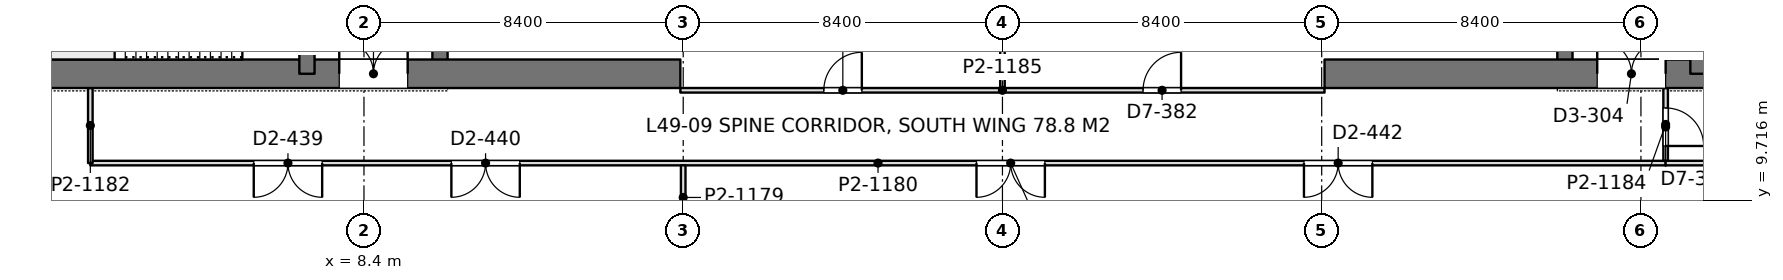
"""IFC4 building model, lengths in metres.
Left out: names, types, materials, properties, quantities, classifications, styles, units other than length and angle.
Written with IfcOpenShell. Run it as: python <this file> out.ifc"""

import sys

from ifc_helpers import new_model, si_unit, direction, frame, frame_2d, origin, place, context, subcontext, project, spatial, rectangle, extrude, element, fill, save


model = new_model("IFC4")
c1 = context("Model", 3, precision=1e-05, world=origin(), true_north=direction((0.0, 1.0)))
c2 = subcontext(c1, "Body", "Model", "MODEL_VIEW")
j1 = project(units=[si_unit("LENGTHUNIT", "METRE"), si_unit("PLANEANGLEUNIT", "RADIAN")], contexts=[c1])
p1 = place(None, origin())
s1 = spatial("IfcSite", under=j1, at=p1, CompositionType="ELEMENT")
p2 = place(p1, origin())
s2 = spatial("IfcBuilding", under=s1, at=p2, CompositionType="ELEMENT")
p3 = place(p2, frame((0.0, 0.0, 215.4)))
s3 = spatial("IfcBuildingStorey", under=s2, at=p3, CompositionType="ELEMENT", Elevation=215.4)
p4 = place(p3, frame((-1.125, 13.05, 0.0), z_axis=(0.0, 0.0, 1.0), x_axis=(1.0, 0.0, 0.0)))
e1 = element("IfcWall", 1, at=p4, inside=s3, PredefinedType="SHEAR", context=c2, shape_type="SweptSolid", body=[
    extrude(rectangle(XDim=17.85, YDim=0.75, at=frame_2d((8.925, 0.0))), origin(), (0.0, 0.0, 1.0), 4.2),
])
p5 = place(p4, frame((8.875, 0.0, 0.0)))
e2 = element("IfcOpeningElement", 2, at=p5, cuts=e1, PredefinedType="OPENING", context=c2, shape_type="SweptSolid", body=[
    extrude(rectangle(XDim=1.8, YDim=2.4, at=frame_2d((0.9, 1.2))), frame((0.0, 0.385, 0.0), z_axis=(0.0, -1.0, 0.0), x_axis=(1.0, 0.0, 0.0)), (0.0, 0.0, 1.0), 0.77),
])
p6 = place(p3, frame((6.9, 13.05, 0.0), z_axis=(0.0, 0.0, 1.0), x_axis=(0.0, 1.0, 0.0)))
e3 = element("IfcWall", 3, at=p6, inside=s3, PredefinedType="SHEAR", context=c2, shape_type="SweptSolid", body=[
    extrude(rectangle(XDim=24.3, YDim=0.4, at=frame_2d((12.15, 0.0))), origin(), (0.0, 0.0, 1.0), 4.2),
])
p7 = place(p6, frame((1.3, 0.0, 0.0)))
e4 = element("IfcOpeningElement", 4, at=p7, cuts=e3, PredefinedType="OPENING", context=c2, shape_type="SweptSolid", body=[
    extrude(rectangle(XDim=1.0, YDim=2.2, at=frame_2d((0.5, 1.1))), frame((0.0, 0.21, 0.0), z_axis=(0.0, -1.0, 0.0), x_axis=(1.0, 0.0, 0.0)), (0.0, 0.0, 1.0), 0.42),
])
p8 = place(p6, frame((22.0, 0.0, 0.0)))
e5 = element("IfcOpeningElement", 5, at=p8, cuts=e3, PredefinedType="OPENING", context=c2, shape_type="SweptSolid", body=[
    extrude(rectangle(XDim=1.0, YDim=2.2, at=frame_2d((0.5, 1.1))), frame((0.0, 0.21, 0.0), z_axis=(0.0, -1.0, 0.0), x_axis=(1.0, 0.0, 0.0)), (0.0, 0.0, 1.0), 0.42),
])
p9 = place(p6, frame((5.55, 0.0, 0.0)))
e6 = element("IfcOpeningElement", 6, at=p9, cuts=e3, PredefinedType="OPENING", context=c2, shape_type="SweptSolid", body=[
    extrude(rectangle(XDim=1.0, YDim=2.2, at=frame_2d((0.5, 1.1))), frame((0.0, 0.21, 0.0), z_axis=(0.0, -1.0, 0.0), x_axis=(1.0, 0.0, 0.0)), (0.0, 0.0, 1.0), 0.42),
])
p10 = place(p6, frame((9.55, 0.0, 0.0)))
e7 = element("IfcOpeningElement", 7, at=p10, cuts=e3, PredefinedType="OPENING", context=c2, shape_type="SweptSolid", body=[
    extrude(rectangle(XDim=1.0, YDim=2.2, at=frame_2d((0.5, 1.1))), frame((0.0, 0.21, 0.0), z_axis=(0.0, -1.0, 0.0), x_axis=(1.0, 0.0, 0.0)), (0.0, 0.0, 1.0), 0.42),
])
p11 = place(p6, frame((12.8, 0.0, 0.0)))
e8 = element("IfcOpeningElement", 8, at=p11, cuts=e3, PredefinedType="OPENING", context=c2, shape_type="SweptSolid", body=[
    extrude(rectangle(XDim=1.1, YDim=2.2, at=frame_2d((0.55, 1.1))), frame((0.0, 0.21, 0.0), z_axis=(0.0, -1.0, 0.0), x_axis=(1.0, 0.0, 0.0)), (0.0, 0.0, 1.0), 0.42),
])
p12 = place(p6, frame((15.538, 0.0, 0.0)))
e9 = element("IfcOpeningElement", 9, at=p12, cuts=e3, PredefinedType="OPENING", context=c2, shape_type="SweptSolid", body=[
    extrude(rectangle(XDim=1.1, YDim=2.2, at=frame_2d((0.55, 1.1))), frame((0.0, 0.21, 0.0), z_axis=(0.0, -1.0, 0.0), x_axis=(1.0, 0.0, 0.0)), (0.0, 0.0, 1.0), 0.42),
])
p13 = place(p6, frame((18.262, 0.0, 0.0)))
e10 = element("IfcOpeningElement", 10, at=p13, cuts=e3, PredefinedType="OPENING", context=c2, shape_type="SweptSolid", body=[
    extrude(rectangle(XDim=1.1, YDim=2.2, at=frame_2d((0.55, 1.1))), frame((0.0, 0.21, 0.0), z_axis=(0.0, -1.0, 0.0), x_axis=(1.0, 0.0, 0.0)), (0.0, 0.0, 1.0), 0.42),
])
p14 = place(p3, frame((10.4, 13.05, 0.0), z_axis=(0.0, 0.0, 1.0), x_axis=(0.0, 1.0, 0.0)))
e11 = element("IfcWall", 11, at=p14, inside=s3, PredefinedType="SHEAR", context=c2, shape_type="SweptSolid", body=[
    extrude(rectangle(XDim=24.3, YDim=0.4, at=frame_2d((12.15, 0.0))), origin(), (0.0, 0.0, 1.0), 4.2),
])
p15 = place(p14, frame((15.75, 0.0, 0.0)))
e12 = element("IfcOpeningElement", 12, at=p15, cuts=e11, PredefinedType="OPENING", context=c2, shape_type="SweptSolid", body=[
    extrude(rectangle(XDim=1.1, YDim=2.2, at=frame_2d((0.55, 1.1))), frame((0.0, 0.21, 0.0), z_axis=(0.0, -1.0, 0.0), x_axis=(1.0, 0.0, 0.0)), (0.0, 0.0, 1.0), 0.42),
])
p16 = place(p14, frame((18.6, 0.0, 0.0)))
e13 = element("IfcOpeningElement", 13, at=p16, cuts=e11, PredefinedType="OPENING", context=c2, shape_type="SweptSolid", body=[
    extrude(rectangle(XDim=1.1, YDim=2.2, at=frame_2d((0.55, 1.1))), frame((0.0, 0.21, 0.0), z_axis=(0.0, -1.0, 0.0), x_axis=(1.0, 0.0, 0.0)), (0.0, 0.0, 1.0), 0.42),
])
p17 = place(p14, frame((21.45, 0.0, 0.0)))
e14 = element("IfcOpeningElement", 14, at=p17, cuts=e11, PredefinedType="OPENING", context=c2, shape_type="SweptSolid", body=[
    extrude(rectangle(XDim=1.1, YDim=2.2, at=frame_2d((0.55, 1.1))), frame((0.0, 0.21, 0.0), z_axis=(0.0, -1.0, 0.0), x_axis=(1.0, 0.0, 0.0)), (0.0, 0.0, 1.0), 0.42),
])
p18 = place(p14, frame((8.65, 0.0, 0.0)))
e15 = element("IfcOpeningElement", 15, at=p18, cuts=e11, PredefinedType="OPENING", context=c2, shape_type="SweptSolid", body=[
    extrude(rectangle(XDim=1.8, YDim=2.4, at=frame_2d((0.9, 1.2))), frame((0.0, 0.21, 0.0), z_axis=(0.0, -1.0, 0.0), x_axis=(1.0, 0.0, 0.0)), (0.0, 0.0, 1.0), 0.42),
])
p19 = place(p3, frame((33.675, 13.05, 0.0), z_axis=(0.0, 0.0, 1.0), x_axis=(1.0, 0.0, 0.0)))
e16 = element("IfcWall", 16, at=p19, inside=s3, PredefinedType="SHEAR", context=c2, shape_type="SweptSolid", body=[
    extrude(rectangle(XDim=17.85, YDim=0.75, at=frame_2d((8.925, 0.0))), origin(), (0.0, 0.0, 1.0), 4.2),
])
p20 = place(p19, frame((7.175, 0.0, 0.0)))
e17 = element("IfcOpeningElement", 17, at=p20, cuts=e16, PredefinedType="OPENING", context=c2, shape_type="SweptSolid", body=[
    extrude(rectangle(XDim=1.8, YDim=2.4, at=frame_2d((0.9, 1.2))), frame((0.0, 0.385, 0.0), z_axis=(0.0, -1.0, 0.0), x_axis=(1.0, 0.0, 0.0)), (0.0, 0.0, 1.0), 0.77),
])
p21 = place(p3, frame((43.5, 13.05, 0.0), z_axis=(0.0, 0.0, 1.0), x_axis=(0.0, 1.0, 0.0)))
e18 = element("IfcWall", 18, at=p21, inside=s3, PredefinedType="SHEAR", context=c2, shape_type="SweptSolid", body=[
    extrude(rectangle(XDim=24.3, YDim=0.4, at=frame_2d((12.15, 0.0))), origin(), (0.0, 0.0, 1.0), 4.2),
])
p22 = place(p21, frame((1.3, 0.0, 0.0)))
e19 = element("IfcOpeningElement", 19, at=p22, cuts=e18, PredefinedType="OPENING", context=c2, shape_type="SweptSolid", body=[
    extrude(rectangle(XDim=1.0, YDim=2.2, at=frame_2d((0.5, 1.1))), frame((0.0, 0.21, 0.0), z_axis=(0.0, -1.0, 0.0), x_axis=(1.0, 0.0, 0.0)), (0.0, 0.0, 1.0), 0.42),
])
p23 = place(p21, frame((22.0, 0.0, 0.0)))
e20 = element("IfcOpeningElement", 20, at=p23, cuts=e18, PredefinedType="OPENING", context=c2, shape_type="SweptSolid", body=[
    extrude(rectangle(XDim=1.0, YDim=2.2, at=frame_2d((0.5, 1.1))), frame((0.0, 0.21, 0.0), z_axis=(0.0, -1.0, 0.0), x_axis=(1.0, 0.0, 0.0)), (0.0, 0.0, 1.0), 0.42),
])
p24 = place(p21, frame((5.55, 0.0, 0.0)))
e21 = element("IfcOpeningElement", 21, at=p24, cuts=e18, PredefinedType="OPENING", context=c2, shape_type="SweptSolid", body=[
    extrude(rectangle(XDim=1.0, YDim=2.2, at=frame_2d((0.5, 1.1))), frame((0.0, 0.21, 0.0), z_axis=(0.0, -1.0, 0.0), x_axis=(1.0, 0.0, 0.0)), (0.0, 0.0, 1.0), 0.42),
])
p25 = place(p21, frame((9.55, 0.0, 0.0)))
e22 = element("IfcOpeningElement", 22, at=p25, cuts=e18, PredefinedType="OPENING", context=c2, shape_type="SweptSolid", body=[
    extrude(rectangle(XDim=1.0, YDim=2.2, at=frame_2d((0.5, 1.1))), frame((0.0, 0.21, 0.0), z_axis=(0.0, -1.0, 0.0), x_axis=(1.0, 0.0, 0.0)), (0.0, 0.0, 1.0), 0.42),
])
p26 = place(p21, frame((12.8, 0.0, 0.0)))
e23 = element("IfcOpeningElement", 23, at=p26, cuts=e18, PredefinedType="OPENING", context=c2, shape_type="SweptSolid", body=[
    extrude(rectangle(XDim=1.1, YDim=2.2, at=frame_2d((0.55, 1.1))), frame((0.0, 0.21, 0.0), z_axis=(0.0, -1.0, 0.0), x_axis=(1.0, 0.0, 0.0)), (0.0, 0.0, 1.0), 0.42),
])
p27 = place(p21, frame((15.538, 0.0, 0.0)))
e24 = element("IfcOpeningElement", 24, at=p27, cuts=e18, PredefinedType="OPENING", context=c2, shape_type="SweptSolid", body=[
    extrude(rectangle(XDim=1.1, YDim=2.2, at=frame_2d((0.55, 1.1))), frame((0.0, 0.21, 0.0), z_axis=(0.0, -1.0, 0.0), x_axis=(1.0, 0.0, 0.0)), (0.0, 0.0, 1.0), 0.42),
])
p28 = place(p21, frame((18.262, 0.0, 0.0)))
e25 = element("IfcOpeningElement", 25, at=p28, cuts=e18, PredefinedType="OPENING", context=c2, shape_type="SweptSolid", body=[
    extrude(rectangle(XDim=1.1, YDim=2.2, at=frame_2d((0.55, 1.1))), frame((0.0, 0.21, 0.0), z_axis=(0.0, -1.0, 0.0), x_axis=(1.0, 0.0, 0.0)), (0.0, 0.0, 1.0), 0.42),
])
p29 = place(p3, frame((40.0, 13.05, 0.0), z_axis=(0.0, 0.0, 1.0), x_axis=(0.0, 1.0, 0.0)))
e26 = element("IfcWall", 26, at=p29, inside=s3, PredefinedType="SHEAR", context=c2, shape_type="SweptSolid", body=[
    extrude(rectangle(XDim=24.3, YDim=0.4, at=frame_2d((12.15, 0.0))), origin(), (0.0, 0.0, 1.0), 4.2),
])
p30 = place(p29, frame((15.75, 0.0, 0.0)))
e27 = element("IfcOpeningElement", 27, at=p30, cuts=e26, PredefinedType="OPENING", context=c2, shape_type="SweptSolid", body=[
    extrude(rectangle(XDim=1.1, YDim=2.2, at=frame_2d((0.55, 1.1))), frame((0.0, 0.21, 0.0), z_axis=(0.0, -1.0, 0.0), x_axis=(1.0, 0.0, 0.0)), (0.0, 0.0, 1.0), 0.42),
])
p31 = place(p29, frame((18.6, 0.0, 0.0)))
e28 = element("IfcOpeningElement", 28, at=p31, cuts=e26, PredefinedType="OPENING", context=c2, shape_type="SweptSolid", body=[
    extrude(rectangle(XDim=1.1, YDim=2.2, at=frame_2d((0.55, 1.1))), frame((0.0, 0.21, 0.0), z_axis=(0.0, -1.0, 0.0), x_axis=(1.0, 0.0, 0.0)), (0.0, 0.0, 1.0), 0.42),
])
p32 = place(p29, frame((21.45, 0.0, 0.0)))
e29 = element("IfcOpeningElement", 29, at=p32, cuts=e26, PredefinedType="OPENING", context=c2, shape_type="SweptSolid", body=[
    extrude(rectangle(XDim=1.1, YDim=2.2, at=frame_2d((0.55, 1.1))), frame((0.0, 0.21, 0.0), z_axis=(0.0, -1.0, 0.0), x_axis=(1.0, 0.0, 0.0)), (0.0, 0.0, 1.0), 0.42),
])
p33 = place(p29, frame((8.65, 0.0, 0.0)))
e30 = element("IfcOpeningElement", 30, at=p33, cuts=e26, PredefinedType="OPENING", context=c2, shape_type="SweptSolid", body=[
    extrude(rectangle(XDim=1.8, YDim=2.4, at=frame_2d((0.9, 1.2))), frame((0.0, 0.21, 0.0), z_axis=(0.0, -1.0, 0.0), x_axis=(1.0, 0.0, 0.0)), (0.0, 0.0, 1.0), 0.42),
])
p34 = place(p3, frame((16.8, 8.949, 0.0), z_axis=(0.0, 0.0, 1.0), x_axis=(0.0, 1.0, 0.0)))
e31 = element("IfcWall", 31, at=p34, inside=s3, PredefinedType="PARTITIONING", context=c2, shape_type="SweptSolid", body=[
    extrude(rectangle(XDim=1.693, YDim=0.12, at=frame_2d((0.847, 0.0))), origin(), (0.0, 0.0, 1.0), 3.69),
])
p35 = place(p3, frame((1.2, 10.7, 0.0), z_axis=(0.0, 0.0, 1.0), x_axis=(1.0, 0.0, 0.0)))
e32 = element("IfcWall", 32, at=p35, inside=s3, PredefinedType="PARTITIONING", context=c2, shape_type="SweptSolid", body=[
    extrude(rectangle(XDim=41.452, YDim=0.12, at=frame_2d((20.726, 0.0))), origin(), (0.0, 0.0, 1.0), 3.55),
])
p36 = place(p35, frame((4.3, 0.0, 0.0)))
e33 = element("IfcOpeningElement", 33, at=p36, cuts=e32, PredefinedType="OPENING", context=c2, shape_type="SweptSolid", body=[
    extrude(rectangle(XDim=1.8, YDim=2.2, at=frame_2d((0.9, 1.1))), frame((0.0, 0.07, 0.0), z_axis=(0.0, -1.0, 0.0), x_axis=(1.0, 0.0, 0.0)), (0.0, 0.0, 1.0), 0.14),
])
p37 = place(p35, frame((9.5, 0.0, 0.0)))
e34 = element("IfcOpeningElement", 34, at=p37, cuts=e32, PredefinedType="OPENING", context=c2, shape_type="SweptSolid", body=[
    extrude(rectangle(XDim=1.8, YDim=2.2, at=frame_2d((0.9, 1.1))), frame((0.0, 0.07, 0.0), z_axis=(0.0, -1.0, 0.0), x_axis=(1.0, 0.0, 0.0)), (0.0, 0.0, 1.0), 0.14),
])
p38 = place(p35, frame((23.317, 0.0, 0.0)))
e35 = element("IfcOpeningElement", 35, at=p38, cuts=e32, PredefinedType="OPENING", context=c2, shape_type="SweptSolid", body=[
    extrude(rectangle(XDim=1.8, YDim=2.2, at=frame_2d((0.9, 1.1))), frame((0.0, 0.07, 0.0), z_axis=(0.0, -1.0, 0.0), x_axis=(1.0, 0.0, 0.0)), (0.0, 0.0, 1.0), 0.14),
])
p39 = place(p35, frame((31.933, 0.0, 0.0)))
e36 = element("IfcOpeningElement", 36, at=p39, cuts=e32, PredefinedType="OPENING", context=c2, shape_type="SweptSolid", body=[
    extrude(rectangle(XDim=1.8, YDim=2.2, at=frame_2d((0.9, 1.1))), frame((0.0, 0.07, 0.0), z_axis=(0.0, -1.0, 0.0), x_axis=(1.0, 0.0, 0.0)), (0.0, 0.0, 1.0), 0.14),
])
p40 = place(p3, frame((1.2, 10.7, 0.0), z_axis=(0.0, 0.0, 1.0), x_axis=(0.0, 1.0, 0.0)))
e37 = element("IfcWall", 37, at=p40, inside=s3, PredefinedType="PARTITIONING", context=c2, shape_type="SweptSolid", body=[
    extrude(rectangle(XDim=1.976, YDim=0.12, at=frame_2d((0.988, 0.0))), origin(), (0.0, 0.0, 1.0), 4.05),
])
p41 = place(p3, frame((42.65, 10.758, 0.0), z_axis=(0.0, 0.0, 1.0), x_axis=(0.0, 1.0, 0.0)))
e38 = element("IfcWall", 38, at=p41, inside=s3, PredefinedType="PARTITIONING", context=c2, shape_type="SweptSolid", body=[
    extrude(rectangle(XDim=1.918, YDim=0.12, at=frame_2d((0.959, 0.0))), origin(), (0.0, 0.0, 1.0), 4.05),
])
p42 = place(p41, frame((0.392, 0.0, 0.0)))
e39 = element("IfcOpeningElement", 39, at=p42, cuts=e38, PredefinedType="OPENING", context=c2, shape_type="SweptSolid", body=[
    extrude(rectangle(XDim=1.0, YDim=2.4, at=frame_2d((0.5, 1.2))), frame((0.0, 0.07, 0.0), z_axis=(0.0, -1.0, 0.0), x_axis=(1.0, 0.0, 0.0)), (0.0, 0.0, 1.0), 0.14),
])
p43 = place(p3, frame((42.648, 10.7, 0.0), z_axis=(0.0, 0.0, 1.0), x_axis=(1.0, 0.0, 0.0)))
e40 = element("IfcWall", 40, at=p43, inside=s3, PredefinedType="PARTITIONING", context=c2, shape_type="SweptSolid", body=[
    extrude(rectangle(XDim=6.552, YDim=0.12, at=frame_2d((3.276, 0.0))), origin(), (0.0, 0.0, 1.0), 4.05),
])
p44 = place(p3, frame((25.2, 12.658, 0.0), z_axis=(0.0, 0.0, 1.0), x_axis=(0.0, 1.0, 0.0)))
e41 = element("IfcWall", 41, at=p44, inside=s3, PredefinedType="PARTITIONING", context=c2, shape_type="SweptSolid", body=[
    extrude(rectangle(XDim=3.593, YDim=0.12, at=frame_2d((1.796, 0.0))), origin(), (0.0, 0.0, 1.0), 3.55),
])
p45 = place(p3, frame((16.725, 12.615, 0.0), z_axis=(0.0, 0.0, 1.0), x_axis=(1.0, 0.0, 0.0)))
e42 = element("IfcWall", 42, at=p45, inside=s3, PredefinedType="PARTITIONING", context=c2, shape_type="SweptSolid", body=[
    extrude(rectangle(XDim=16.95, YDim=0.12, at=frame_2d((8.475, 0.0))), origin(), (0.0, 0.0, 1.0), 3.55),
])
p46 = place(p45, frame((3.775, 0.0, 0.0)))
e43 = element("IfcOpeningElement", 43, at=p46, cuts=e42, PredefinedType="OPENING", context=c2, shape_type="SweptSolid", body=[
    extrude(rectangle(XDim=1.0, YDim=2.4, at=frame_2d((0.5, 1.2))), frame((0.0, 0.07, 0.0), z_axis=(0.0, -1.0, 0.0), x_axis=(1.0, 0.0, 0.0)), (0.0, 0.0, 1.0), 0.14),
])
p47 = place(p45, frame((12.175, 0.0, 0.0)))
e44 = element("IfcOpeningElement", 44, at=p47, cuts=e42, PredefinedType="OPENING", context=c2, shape_type="SweptSolid", body=[
    extrude(rectangle(XDim=1.0, YDim=2.4, at=frame_2d((0.5, 1.2))), frame((0.0, 0.07, 0.0), z_axis=(0.0, -1.0, 0.0), x_axis=(1.0, 0.0, 0.0)), (0.0, 0.0, 1.0), 0.14),
])
p48 = place(p5, origin())
e45 = element("IfcDoor", 45, at=p48, inside=s3, OperationType="DOUBLE_DOOR_SINGLE_SWING", PredefinedType="DOOR", context=c2, shape_type="SweptSolid", body=[
    extrude(rectangle(XDim=1.8, YDim=2.4, at=frame_2d((0.9, 1.2))), frame((0.0, 0.025, 0.0), z_axis=(0.0, -1.0, 0.0), x_axis=(1.0, 0.0, 0.0)), (0.0, 0.0, 1.0), 0.05),
])
fill(e2, e45)
p49 = place(p20, origin())
e46 = element("IfcDoor", 46, at=p49, inside=s3, OperationType="DOUBLE_DOOR_SINGLE_SWING", PredefinedType="DOOR", context=c2, shape_type="SweptSolid", body=[
    extrude(rectangle(XDim=1.8, YDim=2.4, at=frame_2d((0.9, 1.2))), frame((0.0, 0.025, 0.0), z_axis=(0.0, -1.0, 0.0), x_axis=(1.0, 0.0, 0.0)), (0.0, 0.0, 1.0), 0.05),
])
fill(e17, e46)
p50 = place(p36, frame((1.8, 0.0, 0.0), z_axis=(0.0, 0.0, 1.0), x_axis=(-1.0, 0.0, 0.0)))
e47 = element("IfcDoor", 47, at=p50, inside=s3, OperationType="DOUBLE_DOOR_SINGLE_SWING", PredefinedType="DOOR", context=c2, shape_type="SweptSolid", body=[
    extrude(rectangle(XDim=1.8, YDim=2.2, at=frame_2d((0.9, 1.1))), frame((0.0, 0.025, 0.0), z_axis=(0.0, -1.0, 0.0), x_axis=(1.0, 0.0, 0.0)), (0.0, 0.0, 1.0), 0.05),
])
fill(e33, e47)
p51 = place(p37, frame((1.8, 0.0, 0.0), z_axis=(0.0, 0.0, 1.0), x_axis=(-1.0, 0.0, 0.0)))
e48 = element("IfcDoor", 48, at=p51, inside=s3, OperationType="DOUBLE_DOOR_SINGLE_SWING", PredefinedType="DOOR", context=c2, shape_type="SweptSolid", body=[
    extrude(rectangle(XDim=1.8, YDim=2.2, at=frame_2d((0.9, 1.1))), frame((0.0, 0.025, 0.0), z_axis=(0.0, -1.0, 0.0), x_axis=(1.0, 0.0, 0.0)), (0.0, 0.0, 1.0), 0.05),
])
fill(e34, e48)
p52 = place(p38, frame((1.8, 0.0, 0.0), z_axis=(0.0, 0.0, 1.0), x_axis=(-1.0, 0.0, 0.0)))
e49 = element("IfcDoor", 49, at=p52, inside=s3, OperationType="DOUBLE_DOOR_SINGLE_SWING", PredefinedType="DOOR", context=c2, shape_type="SweptSolid", body=[
    extrude(rectangle(XDim=1.8, YDim=2.2, at=frame_2d((0.9, 1.1))), frame((0.0, 0.025, 0.0), z_axis=(0.0, -1.0, 0.0), x_axis=(1.0, 0.0, 0.0)), (0.0, 0.0, 1.0), 0.05),
])
fill(e35, e49)
p53 = place(p39, frame((1.8, 0.0, 0.0), z_axis=(0.0, 0.0, 1.0), x_axis=(-1.0, 0.0, 0.0)))
e50 = element("IfcDoor", 50, at=p53, inside=s3, OperationType="DOUBLE_DOOR_SINGLE_SWING", PredefinedType="DOOR", context=c2, shape_type="SweptSolid", body=[
    extrude(rectangle(XDim=1.8, YDim=2.2, at=frame_2d((0.9, 1.1))), frame((0.0, 0.025, 0.0), z_axis=(0.0, -1.0, 0.0), x_axis=(1.0, 0.0, 0.0)), (0.0, 0.0, 1.0), 0.05),
])
fill(e36, e50)
p54 = place(p42, frame((1.0, 0.0, 0.0), z_axis=(0.0, 0.0, 1.0), x_axis=(-1.0, 0.0, 0.0)))
e51 = element("IfcDoor", 51, at=p54, inside=s3, OperationType="SINGLE_SWING_RIGHT", PredefinedType="DOOR", context=c2, shape_type="SweptSolid", body=[
    extrude(rectangle(XDim=1.0, YDim=2.4, at=frame_2d((0.5, 1.2))), frame((0.0, 0.025, 0.0), z_axis=(0.0, -1.0, 0.0), x_axis=(1.0, 0.0, 0.0)), (0.0, 0.0, 1.0), 0.05),
])
fill(e39, e51)
p55 = place(p46, origin())
e52 = element("IfcDoor", 52, at=p55, inside=s3, OperationType="SINGLE_SWING_RIGHT", PredefinedType="DOOR", context=c2, shape_type="SweptSolid", body=[
    extrude(rectangle(XDim=1.0, YDim=2.4, at=frame_2d((0.5, 1.2))), frame((0.0, 0.025, 0.0), z_axis=(0.0, -1.0, 0.0), x_axis=(1.0, 0.0, 0.0)), (0.0, 0.0, 1.0), 0.05),
])
fill(e43, e52)
p56 = place(p47, origin())
e53 = element("IfcDoor", 53, at=p56, inside=s3, OperationType="SINGLE_SWING_RIGHT", PredefinedType="DOOR", context=c2, shape_type="SweptSolid", body=[
    extrude(rectangle(XDim=1.0, YDim=2.4, at=frame_2d((0.5, 1.2))), frame((0.0, 0.025, 0.0), z_axis=(0.0, -1.0, 0.0), x_axis=(1.0, 0.0, 0.0)), (0.0, 0.0, 1.0), 0.05),
])
fill(e44, e53)
save(model, sys.argv[1])
